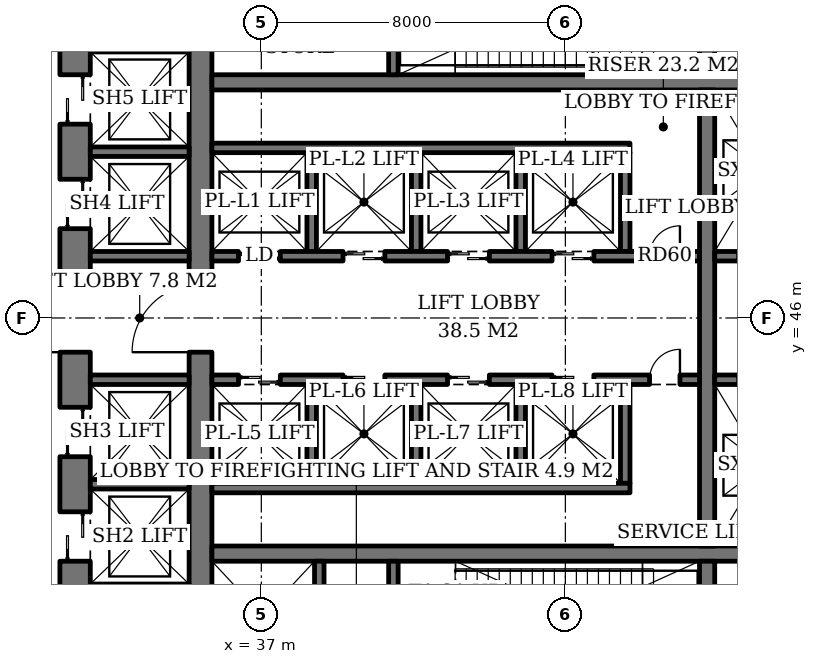
"""IFC4 building model, lengths in metres.
Left out: names, types, materials, properties, quantities, classifications, styles, units other than length and angle.
Written with IfcOpenShell. Run it as: python <this file> out.ifc"""

import sys

from ifc_helpers import new_model, si_unit, direction, frame, frame_2d, origin, place, context, subcontext, project, spatial, rectangle, extrude, element, fill, save


model = new_model("IFC4")
c1 = context("Model", 3, precision=1e-05, world=origin(), true_north=direction((0.0, 1.0)))
c2 = subcontext(c1, "Body", "Model", "MODEL_VIEW")
j1 = project(units=[si_unit("LENGTHUNIT", "METRE"), si_unit("PLANEANGLEUNIT", "RADIAN")], contexts=[c1])
p1 = place(None, origin())
s1 = spatial("IfcSite", under=j1, at=p1, CompositionType="ELEMENT")
p2 = place(p1, origin())
s2 = spatial("IfcBuilding", under=s1, at=p2, CompositionType="ELEMENT")
p3 = place(p2, origin())
s3 = spatial("IfcBuildingStorey", under=s2, at=p3, CompositionType="ELEMENT", Elevation=0.0)
p4 = place(p3, frame((35.4, 36.7, 0.0), z_axis=(0.0, 0.0, 1.0), x_axis=(0.0, 1.0, 0.0)))
e1 = element("IfcWall", 1, at=p4, inside=s3, PredefinedType="SHEAR", context=c2, shape_type="SweptSolid", body=[
    extrude(rectangle(XDim=18.6, YDim=0.6, at=frame_2d((9.3, 0.0))), origin(), (0.0, 0.0, 1.0), 6.0),
])
p5 = place(p4, frame((8.4, 0.0, 0.0)))
e2 = element("IfcOpeningElement", 2, at=p5, cuts=e1, PredefinedType="OPENING", context=c2, shape_type="SweptSolid", body=[
    extrude(rectangle(XDim=1.8, YDim=2.4, at=frame_2d((0.9, 1.2))), frame((0.0, 0.31, 0.0), z_axis=(0.0, -1.0, 0.0), x_axis=(1.0, 0.0, 0.0)), (0.0, 0.0, 1.0), 0.62),
])
p6 = place(p3, frame((32.1, 33.5, 0.0), z_axis=(0.0, 0.0, 1.0), x_axis=(0.0, 1.0, 0.0)))
e3 = element("IfcWall", 3, at=p6, inside=s3, PredefinedType="SHEAR", context=c2, shape_type="SweptSolid", body=[
    extrude(rectangle(XDim=25.0, YDim=0.8, at=frame_2d((12.5, 0.0))), origin(), (0.0, 0.0, 1.0), 6.0),
])
p7 = place(p6, frame((3.35, 0.0, 0.0)))
e4 = element("IfcOpeningElement", 4, at=p7, cuts=e3, PredefinedType="OPENING", context=c2, shape_type="SweptSolid", body=[
    extrude(rectangle(XDim=1.3, YDim=2.2, at=frame_2d((0.65, 1.1))), frame((0.0, 0.41, 0.0), z_axis=(0.0, -1.0, 0.0), x_axis=(1.0, 0.0, 0.0)), (0.0, 0.0, 1.0), 0.82),
])
p8 = place(p6, frame((6.1, 0.0, 0.0)))
e5 = element("IfcOpeningElement", 5, at=p8, cuts=e3, PredefinedType="OPENING", context=c2, shape_type="SweptSolid", body=[
    extrude(rectangle(XDim=1.3, YDim=2.2, at=frame_2d((0.65, 1.1))), frame((0.0, 0.41, 0.0), z_axis=(0.0, -1.0, 0.0), x_axis=(1.0, 0.0, 0.0)), (0.0, 0.0, 1.0), 0.82),
])
p9 = place(p6, frame((8.85, 0.0, 0.0)))
e6 = element("IfcOpeningElement", 6, at=p9, cuts=e3, PredefinedType="OPENING", context=c2, shape_type="SweptSolid", body=[
    extrude(rectangle(XDim=1.3, YDim=2.2, at=frame_2d((0.65, 1.1))), frame((0.0, 0.41, 0.0), z_axis=(0.0, -1.0, 0.0), x_axis=(1.0, 0.0, 0.0)), (0.0, 0.0, 1.0), 0.82),
])
p10 = place(p6, frame((14.85, 0.0, 0.0)))
e7 = element("IfcOpeningElement", 7, at=p10, cuts=e3, PredefinedType="OPENING", context=c2, shape_type="SweptSolid", body=[
    extrude(rectangle(XDim=1.3, YDim=2.2, at=frame_2d((0.65, 1.1))), frame((0.0, 0.41, 0.0), z_axis=(0.0, -1.0, 0.0), x_axis=(1.0, 0.0, 0.0)), (0.0, 0.0, 1.0), 0.82),
])
p11 = place(p6, frame((17.6, 0.0, 0.0)))
e8 = element("IfcOpeningElement", 8, at=p11, cuts=e3, PredefinedType="OPENING", context=c2, shape_type="SweptSolid", body=[
    extrude(rectangle(XDim=1.3, YDim=2.2, at=frame_2d((0.65, 1.1))), frame((0.0, 0.41, 0.0), z_axis=(0.0, -1.0, 0.0), x_axis=(1.0, 0.0, 0.0)), (0.0, 0.0, 1.0), 0.82),
])
p12 = place(p6, frame((11.6, 0.0, 0.0)))
e9 = element("IfcOpeningElement", 9, at=p12, cuts=e3, PredefinedType="OPENING", context=c2, shape_type="SweptSolid", body=[
    extrude(rectangle(XDim=1.8, YDim=2.4, at=frame_2d((0.9, 1.2))), frame((0.0, 0.41, 0.0), z_axis=(0.0, -1.0, 0.0), x_axis=(1.0, 0.0, 0.0)), (0.0, 0.0, 1.0), 0.82),
])
for number, where, z_axis, x_axis in (
    (10, (35.7, 39.8, 0.0), (0.0, 0.0, 1.0), (1.0, 0.0, 0.0)),
    (11, (35.7, 52.2, 0.0), (0.0, 0.0, 1.0), (1.0, 0.0, 0.0)),
):
    element("IfcWall", number, at=place(p3, frame(where, z_axis=z_axis, x_axis=x_axis)), inside=s3, PredefinedType="SHEAR", context=c2, shape_type="SweptSolid", body=[
        extrude(rectangle(XDim=18.6, YDim=0.4, at=frame_2d((9.3, 0.0))), origin(), (0.0, 0.0, 1.0), 6.0),
    ])
p13 = place(p3, frame((48.73, 36.7, 0.0), z_axis=(0.0, 0.0, 1.0), x_axis=(0.0, 1.0, 0.0)))
e12 = element("IfcWall", 12, at=p13, inside=s3, PredefinedType="SHEAR", context=c2, shape_type="SweptSolid", body=[
    extrude(rectangle(XDim=2.9, YDim=0.4, at=frame_2d((1.45, 0.0))), origin(), (0.0, 0.0, 1.0), 6.0),
])
p14 = place(p3, frame((48.73, 40.0, 0.0), z_axis=(0.0, 0.0, 1.0), x_axis=(0.0, 1.0, 0.0)))
e13 = element("IfcWall", 13, at=p14, inside=s3, PredefinedType="SHEAR", context=c2, shape_type="SweptSolid", body=[
    extrude(rectangle(XDim=12.0, YDim=0.4, at=frame_2d((6.0, 0.0))), origin(), (0.0, 0.0, 1.0), 6.0),
])
p15 = place(p3, frame((48.73, 52.4, 0.0), z_axis=(0.0, 0.0, 1.0), x_axis=(0.0, 1.0, 0.0)))
e14 = element("IfcWall", 14, at=p15, inside=s3, PredefinedType="SHEAR", context=c2, shape_type="SweptSolid", body=[
    extrude(rectangle(XDim=2.9, YDim=0.4, at=frame_2d((1.45, 0.0))), origin(), (0.0, 0.0, 1.0), 6.0),
])
p16 = place(p3, frame((38.525, 36.7, 0.0), z_axis=(0.0, 0.0, 1.0), x_axis=(0.0, 1.0, 0.0)))
e15 = element("IfcWall", 15, at=p16, inside=s3, PredefinedType="SHEAR", context=c2, shape_type="SweptSolid", body=[
    extrude(rectangle(XDim=2.9, YDim=0.25, at=frame_2d((1.45, 0.0))), origin(), (0.0, 0.0, 1.0), 6.0),
])
p17 = place(p16, frame((0.8, 0.0, 0.0)))
e16 = element("IfcOpeningElement", 16, at=p17, cuts=e15, PredefinedType="OPENING", context=c2, shape_type="SweptSolid", body=[
    extrude(rectangle(XDim=1.3, YDim=2.2, at=frame_2d((0.65, 1.1))), frame((0.0, 0.135, 0.0), z_axis=(0.0, -1.0, 0.0), x_axis=(1.0, 0.0, 0.0)), (0.0, 0.0, 1.0), 0.27),
])
p18 = place(p3, frame((40.475, 36.7, 0.0), z_axis=(0.0, 0.0, 1.0), x_axis=(0.0, 1.0, 0.0)))
e17 = element("IfcWall", 17, at=p18, inside=s3, PredefinedType="SHEAR", context=c2, shape_type="SweptSolid", body=[
    extrude(rectangle(XDim=2.9, YDim=0.25, at=frame_2d((1.45, 0.0))), origin(), (0.0, 0.0, 1.0), 6.0),
])
p19 = place(p18, frame((0.75, 0.0, 0.0)))
e18 = element("IfcOpeningElement", 18, at=p19, cuts=e17, PredefinedType="OPENING", context=c2, shape_type="SweptSolid", body=[
    extrude(rectangle(XDim=1.2, YDim=2.1, at=frame_2d((0.6, 1.05))), frame((0.0, 0.135, 0.0), z_axis=(0.0, -1.0, 0.0), x_axis=(1.0, 0.0, 0.0)), (0.0, 0.0, 1.0), 0.27),
])
p20 = place(p3, frame((40.475, 52.4, 0.0), z_axis=(0.0, 0.0, 1.0), x_axis=(0.0, 1.0, 0.0)))
e19 = element("IfcWall", 19, at=p20, inside=s3, PredefinedType="SHEAR", context=c2, shape_type="SweptSolid", body=[
    extrude(rectangle(XDim=2.9, YDim=0.25, at=frame_2d((1.45, 0.0))), origin(), (0.0, 0.0, 1.0), 6.0),
])
for number, where, z_axis, x_axis in (
    (20, (38.325, 47.75, 0.0), (0.0, 0.0, 1.0), (0.0, 1.0, 0.0)),
    (21, (41.075, 47.75, 0.0), (0.0, 0.0, 1.0), (0.0, 1.0, 0.0)),
    (22, (43.825, 47.75, 0.0), (0.0, 0.0, 1.0), (0.0, 1.0, 0.0)),
    (23, (46.575, 47.75, 0.0), (0.0, 0.0, 1.0), (0.0, 1.0, 0.0)),
):
    element("IfcWall", number, at=place(p3, frame(where, z_axis=z_axis, x_axis=x_axis)), inside=s3, PredefinedType="SHEAR", context=c2, shape_type="SweptSolid", body=[
        extrude(rectangle(XDim=2.6, YDim=0.25, at=frame_2d((1.3, 0.0))), origin(), (0.0, 0.0, 1.0), 6.0),
    ])
p21 = place(p3, frame((35.7, 50.475, 0.0), z_axis=(0.0, 0.0, 1.0), x_axis=(1.0, 0.0, 0.0)))
e24 = element("IfcWall", 24, at=p21, inside=s3, PredefinedType="SHEAR", context=c2, shape_type="SweptSolid", body=[
    extrude(rectangle(XDim=11.0, YDim=0.25, at=frame_2d((5.5, 0.0))), origin(), (0.0, 0.0, 1.0), 6.0),
])
p22 = place(p3, frame((35.7, 47.625, 0.0), z_axis=(0.0, 0.0, 1.0), x_axis=(1.0, 0.0, 0.0)))
e25 = element("IfcWall", 25, at=p22, inside=s3, PredefinedType="SHEAR", context=c2, shape_type="SweptSolid", body=[
    extrude(rectangle(XDim=12.83, YDim=0.25, at=frame_2d((6.415, 0.0))), origin(), (0.0, 0.0, 1.0), 6.0),
])
p23 = place(p22, frame((0.7, 0.0, 0.0)))
e26 = element("IfcOpeningElement", 26, at=p23, cuts=e25, PredefinedType="OPENING", context=c2, shape_type="SweptSolid", body=[
    extrude(rectangle(XDim=1.1, YDim=2.2, at=frame_2d((0.55, 1.1))), frame((0.0, 0.135, 0.0), z_axis=(0.0, -1.0, 0.0), x_axis=(1.0, 0.0, 0.0)), (0.0, 0.0, 1.0), 0.27),
])
p24 = place(p22, frame((3.45, 0.0, 0.0)))
e27 = element("IfcOpeningElement", 27, at=p24, cuts=e25, PredefinedType="OPENING", context=c2, shape_type="SweptSolid", body=[
    extrude(rectangle(XDim=1.1, YDim=2.2, at=frame_2d((0.55, 1.1))), frame((0.0, 0.135, 0.0), z_axis=(0.0, -1.0, 0.0), x_axis=(1.0, 0.0, 0.0)), (0.0, 0.0, 1.0), 0.27),
])
p25 = place(p22, frame((6.2, 0.0, 0.0)))
e28 = element("IfcOpeningElement", 28, at=p25, cuts=e25, PredefinedType="OPENING", context=c2, shape_type="SweptSolid", body=[
    extrude(rectangle(XDim=1.1, YDim=2.2, at=frame_2d((0.55, 1.1))), frame((0.0, 0.135, 0.0), z_axis=(0.0, -1.0, 0.0), x_axis=(1.0, 0.0, 0.0)), (0.0, 0.0, 1.0), 0.27),
])
p26 = place(p22, frame((8.95, 0.0, 0.0)))
e29 = element("IfcOpeningElement", 29, at=p26, cuts=e25, PredefinedType="OPENING", context=c2, shape_type="SweptSolid", body=[
    extrude(rectangle(XDim=1.1, YDim=2.2, at=frame_2d((0.55, 1.1))), frame((0.0, 0.135, 0.0), z_axis=(0.0, -1.0, 0.0), x_axis=(1.0, 0.0, 0.0)), (0.0, 0.0, 1.0), 0.27),
])
p27 = place(p22, frame((11.515, 0.0, 0.0)))
e30 = element("IfcOpeningElement", 30, at=p27, cuts=e25, PredefinedType="OPENING", context=c2, shape_type="SweptSolid", body=[
    extrude(rectangle(XDim=0.8, YDim=2.0, at=frame_2d((0.4, 1.0))), frame((0.0, 0.135, 0.0), z_axis=(0.0, -1.0, 0.0), x_axis=(1.0, 0.0, 0.0)), (0.0, 0.0, 1.0), 0.27),
])
for number, where, z_axis, x_axis in (
    (31, (38.325, 44.25, 0.0), (0.0, 0.0, 1.0), (0.0, -1.0, 0.0)),
    (32, (41.075, 44.25, 0.0), (0.0, 0.0, 1.0), (0.0, -1.0, 0.0)),
    (33, (43.825, 44.25, 0.0), (0.0, 0.0, 1.0), (0.0, -1.0, 0.0)),
    (34, (46.575, 44.25, 0.0), (0.0, 0.0, 1.0), (0.0, -1.0, 0.0)),
):
    element("IfcWall", number, at=place(p3, frame(where, z_axis=z_axis, x_axis=x_axis)), inside=s3, PredefinedType="SHEAR", context=c2, shape_type="SweptSolid", body=[
        extrude(rectangle(XDim=2.6, YDim=0.25, at=frame_2d((1.3, 0.0))), origin(), (0.0, 0.0, 1.0), 6.0),
    ])
p28 = place(p3, frame((35.7, 41.525, 0.0), z_axis=(0.0, 0.0, 1.0), x_axis=(1.0, 0.0, 0.0)))
e35 = element("IfcWall", 35, at=p28, inside=s3, PredefinedType="SHEAR", context=c2, shape_type="SweptSolid", body=[
    extrude(rectangle(XDim=11.0, YDim=0.25, at=frame_2d((5.5, 0.0))), origin(), (0.0, 0.0, 1.0), 6.0),
])
p29 = place(p3, frame((35.7, 44.375, 0.0), z_axis=(0.0, 0.0, 1.0), x_axis=(1.0, 0.0, 0.0)))
e36 = element("IfcWall", 36, at=p29, inside=s3, PredefinedType="SHEAR", context=c2, shape_type="SweptSolid", body=[
    extrude(rectangle(XDim=12.83, YDim=0.25, at=frame_2d((6.415, 0.0))), origin(), (0.0, 0.0, 1.0), 6.0),
])
p30 = place(p29, frame((0.7, 0.0, 0.0)))
e37 = element("IfcOpeningElement", 37, at=p30, cuts=e36, PredefinedType="OPENING", context=c2, shape_type="SweptSolid", body=[
    extrude(rectangle(XDim=1.1, YDim=2.2, at=frame_2d((0.55, 1.1))), frame((0.0, 0.135, 0.0), z_axis=(0.0, -1.0, 0.0), x_axis=(1.0, 0.0, 0.0)), (0.0, 0.0, 1.0), 0.27),
])
p31 = place(p29, frame((3.45, 0.0, 0.0)))
e38 = element("IfcOpeningElement", 38, at=p31, cuts=e36, PredefinedType="OPENING", context=c2, shape_type="SweptSolid", body=[
    extrude(rectangle(XDim=1.1, YDim=2.2, at=frame_2d((0.55, 1.1))), frame((0.0, 0.135, 0.0), z_axis=(0.0, -1.0, 0.0), x_axis=(1.0, 0.0, 0.0)), (0.0, 0.0, 1.0), 0.27),
])
p32 = place(p29, frame((6.2, 0.0, 0.0)))
e39 = element("IfcOpeningElement", 39, at=p32, cuts=e36, PredefinedType="OPENING", context=c2, shape_type="SweptSolid", body=[
    extrude(rectangle(XDim=1.1, YDim=2.2, at=frame_2d((0.55, 1.1))), frame((0.0, 0.135, 0.0), z_axis=(0.0, -1.0, 0.0), x_axis=(1.0, 0.0, 0.0)), (0.0, 0.0, 1.0), 0.27),
])
p33 = place(p29, frame((8.95, 0.0, 0.0)))
e40 = element("IfcOpeningElement", 40, at=p33, cuts=e36, PredefinedType="OPENING", context=c2, shape_type="SweptSolid", body=[
    extrude(rectangle(XDim=1.1, YDim=2.2, at=frame_2d((0.55, 1.1))), frame((0.0, 0.135, 0.0), z_axis=(0.0, -1.0, 0.0), x_axis=(1.0, 0.0, 0.0)), (0.0, 0.0, 1.0), 0.27),
])
p34 = place(p29, frame((11.515, 0.0, 0.0)))
e41 = element("IfcOpeningElement", 41, at=p34, cuts=e36, PredefinedType="OPENING", context=c2, shape_type="SweptSolid", body=[
    extrude(rectangle(XDim=0.8, YDim=2.0, at=frame_2d((0.4, 1.0))), frame((0.0, 0.135, 0.0), z_axis=(0.0, -1.0, 0.0), x_axis=(1.0, 0.0, 0.0)), (0.0, 0.0, 1.0), 0.27),
])
p35 = place(p3, frame((48.93, 47.625, 0.0), z_axis=(0.0, 0.0, 1.0), x_axis=(1.0, 0.0, 0.0)))
e42 = element("IfcWall", 42, at=p35, inside=s3, PredefinedType="SHEAR", context=c2, shape_type="SweptSolid", body=[
    extrude(rectangle(XDim=5.37, YDim=0.25, at=frame_2d((2.685, 0.0))), origin(), (0.0, 0.0, 1.0), 6.0),
])
p36 = place(p35, frame((0.63, 0.0, 0.0)))
e43 = element("IfcOpeningElement", 43, at=p36, cuts=e42, PredefinedType="OPENING", context=c2, shape_type="SweptSolid", body=[
    extrude(rectangle(XDim=1.3, YDim=2.2, at=frame_2d((0.65, 1.1))), frame((0.0, 0.135, 0.0), z_axis=(0.0, -1.0, 0.0), x_axis=(1.0, 0.0, 0.0)), (0.0, 0.0, 1.0), 0.27),
])
p37 = place(p35, frame((3.44, 0.0, 0.0)))
e44 = element("IfcOpeningElement", 44, at=p37, cuts=e42, PredefinedType="OPENING", context=c2, shape_type="SweptSolid", body=[
    extrude(rectangle(XDim=1.3, YDim=2.2, at=frame_2d((0.65, 1.1))), frame((0.0, 0.135, 0.0), z_axis=(0.0, -1.0, 0.0), x_axis=(1.0, 0.0, 0.0)), (0.0, 0.0, 1.0), 0.27),
])
p38 = place(p3, frame((48.93, 44.375, 0.0), z_axis=(0.0, 0.0, 1.0), x_axis=(1.0, 0.0, 0.0)))
e45 = element("IfcWall", 45, at=p38, inside=s3, PredefinedType="SHEAR", context=c2, shape_type="SweptSolid", body=[
    extrude(rectangle(XDim=5.37, YDim=0.25, at=frame_2d((2.685, 0.0))), origin(), (0.0, 0.0, 1.0), 6.0),
])
p39 = place(p38, frame((0.63, 0.0, 0.0)))
e46 = element("IfcOpeningElement", 46, at=p39, cuts=e45, PredefinedType="OPENING", context=c2, shape_type="SweptSolid", body=[
    extrude(rectangle(XDim=1.3, YDim=2.2, at=frame_2d((0.65, 1.1))), frame((0.0, 0.135, 0.0), z_axis=(0.0, -1.0, 0.0), x_axis=(1.0, 0.0, 0.0)), (0.0, 0.0, 1.0), 0.27),
])
p40 = place(p38, frame((3.44, 0.0, 0.0)))
e47 = element("IfcOpeningElement", 47, at=p40, cuts=e45, PredefinedType="OPENING", context=c2, shape_type="SweptSolid", body=[
    extrude(rectangle(XDim=1.3, YDim=2.2, at=frame_2d((0.65, 1.1))), frame((0.0, 0.135, 0.0), z_axis=(0.0, -1.0, 0.0), x_axis=(1.0, 0.0, 0.0)), (0.0, 0.0, 1.0), 0.27),
])
for number, where, z_axis, x_axis in (
    (48, (32.5, 41.625, 0.0), (0.0, 0.0, 1.0), (1.0, 0.0, 0.0)),
    (49, (32.5, 44.375, 0.0), (0.0, 0.0, 1.0), (1.0, 0.0, 0.0)),
    (50, (32.5, 47.625, 0.0), (0.0, 0.0, 1.0), (1.0, 0.0, 0.0)),
    (51, (32.5, 50.375, 0.0), (0.0, 0.0, 1.0), (1.0, 0.0, 0.0)),
):
    element("IfcWall", number, at=place(p3, frame(where, z_axis=z_axis, x_axis=x_axis)), inside=s3, PredefinedType="SHEAR", context=c2, shape_type="SweptSolid", body=[
        extrude(rectangle(XDim=2.6, YDim=0.25, at=frame_2d((1.3, 0.0))), origin(), (0.0, 0.0, 1.0), 6.0),
    ])
p41 = place(p23, origin())
e52 = element("IfcDoor", 52, at=p41, inside=s3, OperationType="DOUBLE_DOOR_SLIDING", PredefinedType="DOOR", context=c2, shape_type="SweptSolid", body=[
    extrude(rectangle(XDim=1.1, YDim=2.2, at=frame_2d((0.55, 1.1))), frame((0.0, 0.025, 0.0), z_axis=(0.0, -1.0, 0.0), x_axis=(1.0, 0.0, 0.0)), (0.0, 0.0, 1.0), 0.05),
])
fill(e26, e52)
p42 = place(p24, origin())
e53 = element("IfcDoor", 53, at=p42, inside=s3, OperationType="DOUBLE_DOOR_SLIDING", PredefinedType="DOOR", context=c2, shape_type="SweptSolid", body=[
    extrude(rectangle(XDim=1.1, YDim=2.2, at=frame_2d((0.55, 1.1))), frame((0.0, 0.025, 0.0), z_axis=(0.0, -1.0, 0.0), x_axis=(1.0, 0.0, 0.0)), (0.0, 0.0, 1.0), 0.05),
])
fill(e27, e53)
p43 = place(p25, origin())
e54 = element("IfcDoor", 54, at=p43, inside=s3, OperationType="DOUBLE_DOOR_SLIDING", PredefinedType="DOOR", context=c2, shape_type="SweptSolid", body=[
    extrude(rectangle(XDim=1.1, YDim=2.2, at=frame_2d((0.55, 1.1))), frame((0.0, 0.025, 0.0), z_axis=(0.0, -1.0, 0.0), x_axis=(1.0, 0.0, 0.0)), (0.0, 0.0, 1.0), 0.05),
])
fill(e28, e54)
p44 = place(p26, origin())
e55 = element("IfcDoor", 55, at=p44, inside=s3, OperationType="DOUBLE_DOOR_SLIDING", PredefinedType="DOOR", context=c2, shape_type="SweptSolid", body=[
    extrude(rectangle(XDim=1.1, YDim=2.2, at=frame_2d((0.55, 1.1))), frame((0.0, 0.025, 0.0), z_axis=(0.0, -1.0, 0.0), x_axis=(1.0, 0.0, 0.0)), (0.0, 0.0, 1.0), 0.05),
])
fill(e29, e55)
p45 = place(p27, origin())
e56 = element("IfcDoor", 56, at=p45, inside=s3, OperationType="SINGLE_SWING_RIGHT", PredefinedType="DOOR", context=c2, shape_type="SweptSolid", body=[
    extrude(rectangle(XDim=0.8, YDim=2.0, at=frame_2d((0.4, 1.0))), frame((0.0, 0.025, 0.0), z_axis=(0.0, -1.0, 0.0), x_axis=(1.0, 0.0, 0.0)), (0.0, 0.0, 1.0), 0.05),
])
fill(e30, e56)
p46 = place(p30, origin())
e57 = element("IfcDoor", 57, at=p46, inside=s3, OperationType="DOUBLE_DOOR_SLIDING", PredefinedType="DOOR", context=c2, shape_type="SweptSolid", body=[
    extrude(rectangle(XDim=1.1, YDim=2.2, at=frame_2d((0.55, 1.1))), frame((0.0, 0.025, 0.0), z_axis=(0.0, -1.0, 0.0), x_axis=(1.0, 0.0, 0.0)), (0.0, 0.0, 1.0), 0.05),
])
fill(e37, e57)
p47 = place(p31, origin())
e58 = element("IfcDoor", 58, at=p47, inside=s3, OperationType="DOUBLE_DOOR_SLIDING", PredefinedType="DOOR", context=c2, shape_type="SweptSolid", body=[
    extrude(rectangle(XDim=1.1, YDim=2.2, at=frame_2d((0.55, 1.1))), frame((0.0, 0.025, 0.0), z_axis=(0.0, -1.0, 0.0), x_axis=(1.0, 0.0, 0.0)), (0.0, 0.0, 1.0), 0.05),
])
fill(e38, e58)
p48 = place(p32, origin())
e59 = element("IfcDoor", 59, at=p48, inside=s3, OperationType="DOUBLE_DOOR_SLIDING", PredefinedType="DOOR", context=c2, shape_type="SweptSolid", body=[
    extrude(rectangle(XDim=1.1, YDim=2.2, at=frame_2d((0.55, 1.1))), frame((0.0, 0.025, 0.0), z_axis=(0.0, -1.0, 0.0), x_axis=(1.0, 0.0, 0.0)), (0.0, 0.0, 1.0), 0.05),
])
fill(e39, e59)
p49 = place(p33, origin())
e60 = element("IfcDoor", 60, at=p49, inside=s3, OperationType="DOUBLE_DOOR_SLIDING", PredefinedType="DOOR", context=c2, shape_type="SweptSolid", body=[
    extrude(rectangle(XDim=1.1, YDim=2.2, at=frame_2d((0.55, 1.1))), frame((0.0, 0.025, 0.0), z_axis=(0.0, -1.0, 0.0), x_axis=(1.0, 0.0, 0.0)), (0.0, 0.0, 1.0), 0.05),
])
fill(e40, e60)
p50 = place(p34, origin())
e61 = element("IfcDoor", 61, at=p50, inside=s3, OperationType="SINGLE_SWING_RIGHT", PredefinedType="DOOR", context=c2, shape_type="SweptSolid", body=[
    extrude(rectangle(XDim=0.8, YDim=2.0, at=frame_2d((0.4, 1.0))), frame((0.0, 0.025, 0.0), z_axis=(0.0, -1.0, 0.0), x_axis=(1.0, 0.0, 0.0)), (0.0, 0.0, 1.0), 0.05),
])
fill(e41, e61)
p51 = place(p5, origin())
e62 = element("IfcDoor", 62, at=p51, inside=s3, OperationType="DOUBLE_DOOR_SINGLE_SWING", PredefinedType="DOOR", context=c2, shape_type="SweptSolid", body=[
    extrude(rectangle(XDim=1.8, YDim=2.4, at=frame_2d((0.9, 1.2))), frame((0.0, 0.025, 0.0), z_axis=(0.0, -1.0, 0.0), x_axis=(1.0, 0.0, 0.0)), (0.0, 0.0, 1.0), 0.05),
])
fill(e2, e62)
p52 = place(p8, origin())
e63 = element("IfcDoor", 63, at=p52, inside=s3, OperationType="DOUBLE_DOOR_SLIDING", PredefinedType="DOOR", context=c2, shape_type="SweptSolid", body=[
    extrude(rectangle(XDim=1.3, YDim=2.2, at=frame_2d((0.65, 1.1))), frame((0.0, 0.025, 0.0), z_axis=(0.0, -1.0, 0.0), x_axis=(1.0, 0.0, 0.0)), (0.0, 0.0, 1.0), 0.05),
])
fill(e5, e63)
p53 = place(p9, origin())
e64 = element("IfcDoor", 64, at=p53, inside=s3, OperationType="DOUBLE_DOOR_SLIDING", PredefinedType="DOOR", context=c2, shape_type="SweptSolid", body=[
    extrude(rectangle(XDim=1.3, YDim=2.2, at=frame_2d((0.65, 1.1))), frame((0.0, 0.025, 0.0), z_axis=(0.0, -1.0, 0.0), x_axis=(1.0, 0.0, 0.0)), (0.0, 0.0, 1.0), 0.05),
])
fill(e6, e64)
p54 = place(p10, origin())
e65 = element("IfcDoor", 65, at=p54, inside=s3, OperationType="DOUBLE_DOOR_SLIDING", PredefinedType="DOOR", context=c2, shape_type="SweptSolid", body=[
    extrude(rectangle(XDim=1.3, YDim=2.2, at=frame_2d((0.65, 1.1))), frame((0.0, 0.025, 0.0), z_axis=(0.0, -1.0, 0.0), x_axis=(1.0, 0.0, 0.0)), (0.0, 0.0, 1.0), 0.05),
])
fill(e7, e65)
p55 = place(p11, origin())
e66 = element("IfcDoor", 66, at=p55, inside=s3, OperationType="DOUBLE_DOOR_SLIDING", PredefinedType="DOOR", context=c2, shape_type="SweptSolid", body=[
    extrude(rectangle(XDim=1.3, YDim=2.2, at=frame_2d((0.65, 1.1))), frame((0.0, 0.025, 0.0), z_axis=(0.0, -1.0, 0.0), x_axis=(1.0, 0.0, 0.0)), (0.0, 0.0, 1.0), 0.05),
])
fill(e8, e66)
p56 = place(p12, origin())
e67 = element("IfcDoor", 67, at=p56, inside=s3, OperationType="DOUBLE_DOOR_SINGLE_SWING", PredefinedType="DOOR", context=c2, shape_type="SweptSolid", body=[
    extrude(rectangle(XDim=1.8, YDim=2.4, at=frame_2d((0.9, 1.2))), frame((0.0, 0.025, 0.0), z_axis=(0.0, -1.0, 0.0), x_axis=(1.0, 0.0, 0.0)), (0.0, 0.0, 1.0), 0.05),
])
fill(e9, e67)
save(model, sys.argv[1])
